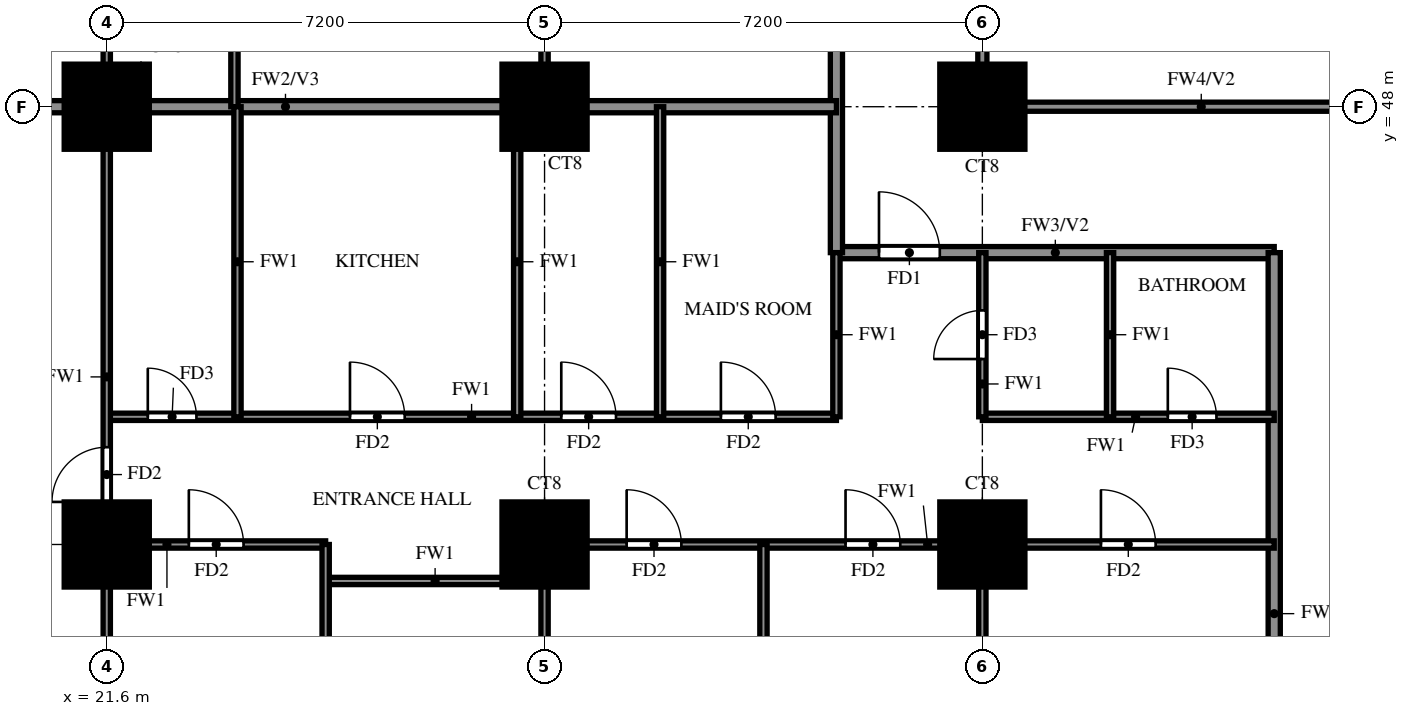
"""IFC4 building model, lengths in metres.
Left out: names, types, materials, properties, quantities, classifications, styles, units other than length and angle.
Written with IfcOpenShell. Run it as: python <this file> out.ifc"""

import sys

from ifc_helpers import new_model, si_unit, direction, frame, frame_2d, origin, origin_2d, place, context, subcontext, project, spatial, rectangle, extrude, source, transform, mapped, element, fill, save


model = new_model("IFC4")
c1 = context("Model", 3, precision=1e-05, world=origin(), true_north=direction((0.0, 1.0)))
c2 = subcontext(c1, "Body", "Model", "MODEL_VIEW")
j1 = project(units=[si_unit("LENGTHUNIT", "METRE"), si_unit("PLANEANGLEUNIT", "RADIAN")], contexts=[c1])
p1 = place(None, origin())
s1 = spatial("IfcSite", under=j1, at=p1, CompositionType="ELEMENT")
p2 = place(p1, origin())
s2 = spatial("IfcBuilding", under=s1, at=p2, CompositionType="ELEMENT")
p3 = place(p2, frame((0.0, 0.0, 51.5)))
s3 = spatial("IfcBuildingStorey", under=s2, at=p3, CompositionType="ELEMENT", Elevation=51.5)
m1 = source(origin(), c2, "Body", "SweptSolid", [
    extrude(rectangle(XDim=1.4, YDim=1.4, at=origin_2d()), origin(), (0.0, 0.0, 1.0), 3.18),
])
for number, where, z_axis, x_axis in (
    (1, (21.6, 40.8, 0.0), (0.0, 0.0, 1.0), (1.0, 0.0, 0.0)),
    (2, (28.8, 40.8, 0.0), (0.0, 0.0, 1.0), (1.0, 0.0, 0.0)),
    (3, (36.0, 40.8, 0.0), (0.0, 0.0, 1.0), (1.0, 0.0, 0.0)),
    (4, (21.6, 48.0, 0.0), (0.0, 0.0, 1.0), (1.0, 0.0, 0.0)),
    (5, (28.8, 48.0, 0.0), (0.0, 0.0, 1.0), (1.0, 0.0, 0.0)),
    (6, (36.0, 48.0, 0.0), (0.0, 0.0, 1.0), (1.0, 0.0, 0.0)),
):
    element("IfcColumn", number, at=place(p3, frame(where, z_axis=z_axis, x_axis=x_axis)), inside=s3, PredefinedType="COLUMN", context=c2, shape_type="MappedRepresentation", body=[
        mapped(m1, transform((0.0, 0.0, 0.0))),
    ])
p4 = place(p3, frame((33.6, 45.6, 0.0), z_axis=(0.0, 0.0, 1.0), x_axis=(1.0, 0.0, 0.0)))
e7 = element("IfcWall", 7, at=p4, inside=s3, PredefinedType="SOLIDWALL", context=c2, shape_type="SweptSolid", body=[
    extrude(rectangle(XDim=7.2, YDim=0.2, at=frame_2d((3.6, 0.0))), origin(), (0.0, 0.0, 1.0), 3.18),
])
p5 = place(p4, frame((0.7, 0.0, 0.0)))
e8 = element("IfcOpeningElement", 8, at=p5, cuts=e7, PredefinedType="OPENING", context=c2, shape_type="SweptSolid", body=[
    extrude(rectangle(XDim=1.0, YDim=2.1, at=frame_2d((0.5, 1.05))), frame((0.0, 0.11, 0.0), z_axis=(0.0, -1.0, 0.0), x_axis=(1.0, 0.0, 0.0)), (0.0, 0.0, 1.0), 0.22),
])
p6 = place(p3, frame((33.6, 45.6, 0.0), z_axis=(0.0, 0.0, 1.0), x_axis=(0.0, 1.0, 0.0)))
e9 = element("IfcWall", 9, at=p6, inside=s3, PredefinedType="SOLIDWALL", context=c2, shape_type="SweptSolid", body=[
    extrude(rectangle(XDim=8.4, YDim=0.2, at=frame_2d((4.2, 0.0))), origin(), (0.0, 0.0, 1.0), 3.18),
])
p7 = place(p3, frame((40.8, 33.725, 0.0), z_axis=(0.0, 0.0, 1.0), x_axis=(0.0, 1.0, 0.0)))
e10 = element("IfcWall", 10, at=p7, inside=s3, PredefinedType="SOLIDWALL", context=c2, shape_type="SweptSolid", body=[
    extrude(rectangle(XDim=11.875, YDim=0.2, at=frame_2d((5.938, 0.0))), origin(), (0.0, 0.0, 1.0), 2.28),
])
p8 = place(p3, frame((14.525, 48.0, 0.0), z_axis=(0.0, 0.0, 1.0), x_axis=(1.0, 0.0, 0.0)))
e11 = element("IfcWall", 11, at=p8, inside=s3, PredefinedType="SOLIDWALL", context=c2, shape_type="SweptSolid", body=[
    extrude(rectangle(XDim=19.075, YDim=0.2, at=frame_2d((9.538, 0.0))), origin(), (0.0, 0.0, 1.0), 3.18),
])
p9 = place(p3, frame((25.2, 40.2, 0.0), z_axis=(0.0, 0.0, 1.0), x_axis=(1.0, 0.0, 0.0)))
e12 = element("IfcWall", 12, at=p9, inside=s3, PredefinedType="PARTITIONING", context=c2, shape_type="SweptSolid", body=[
    extrude(rectangle(XDim=3.6, YDim=0.12, at=frame_2d((1.8, 0.0))), origin(), (0.0, 0.0, 1.0), 3.18),
])
p10 = place(p3, frame((21.6, 40.8, 0.0), z_axis=(0.0, 0.0, 1.0), x_axis=(1.0, 0.0, 0.0)))
e13 = element("IfcWall", 13, at=p10, inside=s3, PredefinedType="PARTITIONING", context=c2, shape_type="SweptSolid", body=[
    extrude(rectangle(XDim=3.6, YDim=0.12, at=frame_2d((1.8, 0.0))), origin(), (0.0, 0.0, 1.0), 3.18),
])
p11 = place(p10, frame((1.35, 0.0, 0.0)))
e14 = element("IfcOpeningElement", 14, at=p11, cuts=e13, PredefinedType="OPENING", context=c2, shape_type="SweptSolid", body=[
    extrude(rectangle(XDim=0.9, YDim=2.1, at=frame_2d((0.45, 1.05))), frame((0.0, 0.07, 0.0), z_axis=(0.0, -1.0, 0.0), x_axis=(1.0, 0.0, 0.0)), (0.0, 0.0, 1.0), 0.14),
])
p12 = place(p3, frame((28.8, 40.8, 0.0), z_axis=(0.0, 0.0, 1.0), x_axis=(1.0, 0.0, 0.0)))
e15 = element("IfcWall", 15, at=p12, inside=s3, PredefinedType="PARTITIONING", context=c2, shape_type="SweptSolid", body=[
    extrude(rectangle(XDim=12.0, YDim=0.12, at=frame_2d((6.0, 0.0))), origin(), (0.0, 0.0, 1.0), 3.18),
])
p13 = place(p12, frame((1.35, 0.0, 0.0)))
e16 = element("IfcOpeningElement", 16, at=p13, cuts=e15, PredefinedType="OPENING", context=c2, shape_type="SweptSolid", body=[
    extrude(rectangle(XDim=0.9, YDim=2.1, at=frame_2d((0.45, 1.05))), frame((0.0, 0.07, 0.0), z_axis=(0.0, -1.0, 0.0), x_axis=(1.0, 0.0, 0.0)), (0.0, 0.0, 1.0), 0.14),
])
p14 = place(p12, frame((4.95, 0.0, 0.0)))
e17 = element("IfcOpeningElement", 17, at=p14, cuts=e15, PredefinedType="OPENING", context=c2, shape_type="SweptSolid", body=[
    extrude(rectangle(XDim=0.9, YDim=2.1, at=frame_2d((0.45, 1.05))), frame((0.0, 0.07, 0.0), z_axis=(0.0, -1.0, 0.0), x_axis=(1.0, 0.0, 0.0)), (0.0, 0.0, 1.0), 0.14),
])
p15 = place(p12, frame((9.15, 0.0, 0.0)))
e18 = element("IfcOpeningElement", 18, at=p15, cuts=e15, PredefinedType="OPENING", context=c2, shape_type="SweptSolid", body=[
    extrude(rectangle(XDim=0.9, YDim=2.1, at=frame_2d((0.45, 1.05))), frame((0.0, 0.07, 0.0), z_axis=(0.0, -1.0, 0.0), x_axis=(1.0, 0.0, 0.0)), (0.0, 0.0, 1.0), 0.14),
])
p16 = place(p3, frame((21.6, 42.9, 0.0), z_axis=(0.0, 0.0, 1.0), x_axis=(1.0, 0.0, 0.0)))
e19 = element("IfcWall", 19, at=p16, inside=s3, PredefinedType="PARTITIONING", context=c2, shape_type="SweptSolid", body=[
    extrude(rectangle(XDim=12.0, YDim=0.12, at=frame_2d((6.0, 0.0))), origin(), (0.0, 0.0, 1.0), 3.18),
])
p17 = place(p16, frame((0.675, 0.0, 0.0)))
e20 = element("IfcOpeningElement", 20, at=p17, cuts=e19, PredefinedType="OPENING", context=c2, shape_type="SweptSolid", body=[
    extrude(rectangle(XDim=0.8, YDim=2.1, at=frame_2d((0.4, 1.05))), frame((0.0, 0.07, 0.0), z_axis=(0.0, -1.0, 0.0), x_axis=(1.0, 0.0, 0.0)), (0.0, 0.0, 1.0), 0.14),
])
p18 = place(p16, frame((4.0, 0.0, 0.0)))
e21 = element("IfcOpeningElement", 21, at=p18, cuts=e19, PredefinedType="OPENING", context=c2, shape_type="SweptSolid", body=[
    extrude(rectangle(XDim=0.9, YDim=2.1, at=frame_2d((0.45, 1.05))), frame((0.0, 0.07, 0.0), z_axis=(0.0, -1.0, 0.0), x_axis=(1.0, 0.0, 0.0)), (0.0, 0.0, 1.0), 0.14),
])
p19 = place(p16, frame((7.475, 0.0, 0.0)))
e22 = element("IfcOpeningElement", 22, at=p19, cuts=e19, PredefinedType="OPENING", context=c2, shape_type="SweptSolid", body=[
    extrude(rectangle(XDim=0.9, YDim=2.1, at=frame_2d((0.45, 1.05))), frame((0.0, 0.07, 0.0), z_axis=(0.0, -1.0, 0.0), x_axis=(1.0, 0.0, 0.0)), (0.0, 0.0, 1.0), 0.14),
])
p20 = place(p16, frame((10.1, 0.0, 0.0)))
e23 = element("IfcOpeningElement", 23, at=p20, cuts=e19, PredefinedType="OPENING", context=c2, shape_type="SweptSolid", body=[
    extrude(rectangle(XDim=0.9, YDim=2.1, at=frame_2d((0.45, 1.05))), frame((0.0, 0.07, 0.0), z_axis=(0.0, -1.0, 0.0), x_axis=(1.0, 0.0, 0.0)), (0.0, 0.0, 1.0), 0.14),
])
p21 = place(p3, frame((36.0, 42.9, 0.0), z_axis=(0.0, 0.0, 1.0), x_axis=(1.0, 0.0, 0.0)))
e24 = element("IfcWall", 24, at=p21, inside=s3, PredefinedType="PARTITIONING", context=c2, shape_type="SweptSolid", body=[
    extrude(rectangle(XDim=4.8, YDim=0.12, at=frame_2d((2.4, 0.0))), origin(), (0.0, 0.0, 1.0), 3.18),
])
p22 = place(p21, frame((3.05, 0.0, 0.0)))
e25 = element("IfcOpeningElement", 25, at=p22, cuts=e24, PredefinedType="OPENING", context=c2, shape_type="SweptSolid", body=[
    extrude(rectangle(XDim=0.8, YDim=2.1, at=frame_2d((0.4, 1.05))), frame((0.0, 0.07, 0.0), z_axis=(0.0, -1.0, 0.0), x_axis=(1.0, 0.0, 0.0)), (0.0, 0.0, 1.0), 0.14),
])
p23 = place(p3, frame((21.6, 33.725, 0.0), z_axis=(0.0, 0.0, 1.0), x_axis=(0.0, 1.0, 0.0)))
e26 = element("IfcWall", 26, at=p23, inside=s3, PredefinedType="PARTITIONING", context=c2, shape_type="SweptSolid", body=[
    extrude(rectangle(XDim=17.875, YDim=0.12, at=frame_2d((8.938, 0.0))), origin(), (0.0, 0.0, 1.0), 3.18),
])
p24 = place(p23, frame((7.775, 0.0, 0.0)))
e27 = element("IfcOpeningElement", 27, at=p24, cuts=e26, PredefinedType="OPENING", context=c2, shape_type="SweptSolid", body=[
    extrude(rectangle(XDim=0.9, YDim=2.1, at=frame_2d((0.45, 1.05))), frame((0.0, 0.07, 0.0), z_axis=(0.0, -1.0, 0.0), x_axis=(1.0, 0.0, 0.0)), (0.0, 0.0, 1.0), 0.14),
])
p25 = place(p23, frame((15.625, 0.0, 0.0)))
e28 = element("IfcOpeningElement", 28, at=p25, cuts=e26, PredefinedType="OPENING", context=c2, shape_type="SweptSolid", body=[
    extrude(rectangle(XDim=0.9, YDim=2.1, at=frame_2d((0.45, 1.05))), frame((0.0, 0.07, 0.0), z_axis=(0.0, -1.0, 0.0), x_axis=(1.0, 0.0, 0.0)), (0.0, 0.0, 1.0), 0.14),
])
p26 = place(p3, frame((23.7, 48.0, 0.0), z_axis=(0.0, 0.0, 1.0), x_axis=(0.0, 1.0, 0.0)))
e29 = element("IfcWall", 29, at=p26, inside=s3, PredefinedType="PARTITIONING", context=c2, shape_type="SweptSolid", body=[
    extrude(rectangle(XDim=3.6, YDim=0.12, at=frame_2d((1.8, 0.0))), origin(), (0.0, 0.0, 1.0), 3.18),
])
p27 = place(p3, frame((23.75, 42.9, 0.0), z_axis=(0.0, 0.0, 1.0), x_axis=(0.0, 1.0, 0.0)))
e30 = element("IfcWall", 30, at=p27, inside=s3, PredefinedType="PARTITIONING", context=c2, shape_type="SweptSolid", body=[
    extrude(rectangle(XDim=5.1, YDim=0.12, at=frame_2d((2.55, 0.0))), origin(), (0.0, 0.0, 1.0), 3.18),
])
p28 = place(p3, frame((25.2, 33.725, 0.0), z_axis=(0.0, 0.0, 1.0), x_axis=(0.0, 1.0, 0.0)))
e31 = element("IfcWall", 31, at=p28, inside=s3, PredefinedType="PARTITIONING", context=c2, shape_type="SweptSolid", body=[
    extrude(rectangle(XDim=7.075, YDim=0.12, at=frame_2d((3.538, 0.0))), origin(), (0.0, 0.0, 1.0), 2.28),
])
p29 = place(p28, frame((2.837, 0.0, 0.0)))
e32 = element("IfcOpeningElement", 32, at=p29, cuts=e31, PredefinedType="OPENING", context=c2, shape_type="SweptSolid", body=[
    extrude(rectangle(XDim=0.8, YDim=2.1, at=frame_2d((0.4, 1.05))), frame((0.0, 0.07, 0.0), z_axis=(0.0, -1.0, 0.0), x_axis=(1.0, 0.0, 0.0)), (0.0, 0.0, 1.0), 0.14),
])
p30 = place(p3, frame((28.35, 42.9, 0.0), z_axis=(0.0, 0.0, 1.0), x_axis=(0.0, 1.0, 0.0)))
e33 = element("IfcWall", 33, at=p30, inside=s3, PredefinedType="PARTITIONING", context=c2, shape_type="SweptSolid", body=[
    extrude(rectangle(XDim=5.1, YDim=0.12, at=frame_2d((2.55, 0.0))), origin(), (0.0, 0.0, 1.0), 3.18),
])
p31 = place(p3, frame((28.8, 33.725, 0.0), z_axis=(0.0, 0.0, 1.0), x_axis=(0.0, 1.0, 0.0)))
e34 = element("IfcWall", 34, at=p31, inside=s3, PredefinedType="PARTITIONING", context=c2, shape_type="SweptSolid", body=[
    extrude(rectangle(XDim=7.075, YDim=0.12, at=frame_2d((3.538, 0.0))), origin(), (0.0, 0.0, 1.0), 3.18),
])
p32 = place(p3, frame((28.8, 48.0, 0.0), z_axis=(0.0, 0.0, 1.0), x_axis=(0.0, 1.0, 0.0)))
e35 = element("IfcWall", 35, at=p32, inside=s3, PredefinedType="PARTITIONING", context=c2, shape_type="SweptSolid", body=[
    extrude(rectangle(XDim=3.6, YDim=0.12, at=frame_2d((1.8, 0.0))), origin(), (0.0, 0.0, 1.0), 3.18),
])
p33 = place(p3, frame((30.7, 42.9, 0.0), z_axis=(0.0, 0.0, 1.0), x_axis=(0.0, 1.0, 0.0)))
e36 = element("IfcWall", 36, at=p33, inside=s3, PredefinedType="PARTITIONING", context=c2, shape_type="SweptSolid", body=[
    extrude(rectangle(XDim=5.1, YDim=0.12, at=frame_2d((2.55, 0.0))), origin(), (0.0, 0.0, 1.0), 3.18),
])
p34 = place(p3, frame((32.4, 33.725, 0.0), z_axis=(0.0, 0.0, 1.0), x_axis=(0.0, 1.0, 0.0)))
e37 = element("IfcWall", 37, at=p34, inside=s3, PredefinedType="PARTITIONING", context=c2, shape_type="SweptSolid", body=[
    extrude(rectangle(XDim=7.075, YDim=0.12, at=frame_2d((3.538, 0.0))), origin(), (0.0, 0.0, 1.0), 2.28),
])
p35 = place(p3, frame((33.6, 42.9, 0.0), z_axis=(0.0, 0.0, 1.0), x_axis=(0.0, 1.0, 0.0)))
e38 = element("IfcWall", 38, at=p35, inside=s3, PredefinedType="PARTITIONING", context=c2, shape_type="SweptSolid", body=[
    extrude(rectangle(XDim=2.7, YDim=0.12, at=frame_2d((1.35, 0.0))), origin(), (0.0, 0.0, 1.0), 3.18),
])
p36 = place(p3, frame((36.0, 33.725, 0.0), z_axis=(0.0, 0.0, 1.0), x_axis=(0.0, 1.0, 0.0)))
e39 = element("IfcWall", 39, at=p36, inside=s3, PredefinedType="PARTITIONING", context=c2, shape_type="SweptSolid", body=[
    extrude(rectangle(XDim=7.075, YDim=0.12, at=frame_2d((3.538, 0.0))), origin(), (0.0, 0.0, 1.0), 3.18),
])
p37 = place(p3, frame((36.0, 42.9, 0.0), z_axis=(0.0, 0.0, 1.0), x_axis=(0.0, 1.0, 0.0)))
e40 = element("IfcWall", 40, at=p37, inside=s3, PredefinedType="PARTITIONING", context=c2, shape_type="SweptSolid", body=[
    extrude(rectangle(XDim=2.7, YDim=0.12, at=frame_2d((1.35, 0.0))), origin(), (0.0, 0.0, 1.0), 3.18),
])
p38 = place(p37, frame((0.95, 0.0, 0.0)))
e41 = element("IfcOpeningElement", 41, at=p38, cuts=e40, PredefinedType="OPENING", context=c2, shape_type="SweptSolid", body=[
    extrude(rectangle(XDim=0.8, YDim=2.1, at=frame_2d((0.4, 1.05))), frame((0.0, 0.07, 0.0), z_axis=(0.0, -1.0, 0.0), x_axis=(1.0, 0.0, 0.0)), (0.0, 0.0, 1.0), 0.14),
])
p39 = place(p3, frame((38.1, 42.9, 0.0), z_axis=(0.0, 0.0, 1.0), x_axis=(0.0, 1.0, 0.0)))
e42 = element("IfcWall", 42, at=p39, inside=s3, PredefinedType="PARTITIONING", context=c2, shape_type="SweptSolid", body=[
    extrude(rectangle(XDim=2.7, YDim=0.12, at=frame_2d((1.35, 0.0))), origin(), (0.0, 0.0, 1.0), 3.18),
])
p40 = place(p3, frame((36.0, 48.0, 0.0), z_axis=(0.0, 0.0, 1.0), x_axis=(1.0, 0.0, 0.0)))
e43 = element("IfcWall", 43, at=p40, inside=s3, PredefinedType="SOLIDWALL", context=c2, shape_type="SweptSolid", body=[
    extrude(rectangle(XDim=7.2, YDim=0.15, at=frame_2d((3.6, 0.0))), origin(), (0.0, 0.0, 1.0), 2.28),
])
p41 = place(p3, frame((36.0, 48.0, 0.0), z_axis=(0.0, 0.0, 1.0), x_axis=(0.0, 1.0, 0.0)))
e44 = element("IfcWall", 44, at=p41, inside=s3, PredefinedType="SOLIDWALL", context=c2, shape_type="SweptSolid", body=[
    extrude(rectangle(XDim=14.4, YDim=0.15, at=frame_2d((7.2, 0.0))), origin(), (0.0, 0.0, 1.0), 2.28),
])
p42 = place(p5, origin())
e45 = element("IfcDoor", 45, at=p42, inside=s3, OperationType="SINGLE_SWING_RIGHT", PredefinedType="DOOR", context=c2, shape_type="SweptSolid", body=[
    extrude(rectangle(XDim=1.0, YDim=2.1, at=frame_2d((0.5, 1.05))), frame((0.0, 0.025, 0.0), z_axis=(0.0, -1.0, 0.0), x_axis=(1.0, 0.0, 0.0)), (0.0, 0.0, 1.0), 0.05),
])
fill(e8, e45)
p43 = place(p24, origin())
e46 = element("IfcDoor", 46, at=p43, inside=s3, OperationType="SINGLE_SWING_RIGHT", PredefinedType="DOOR", context=c2, shape_type="SweptSolid", body=[
    extrude(rectangle(XDim=0.9, YDim=2.1, at=frame_2d((0.45, 1.05))), frame((0.0, 0.025, 0.0), z_axis=(0.0, -1.0, 0.0), x_axis=(1.0, 0.0, 0.0)), (0.0, 0.0, 1.0), 0.05),
])
fill(e27, e46)
p44 = place(p11, origin())
e47 = element("IfcDoor", 47, at=p44, inside=s3, OperationType="SINGLE_SWING_LEFT", PredefinedType="DOOR", context=c2, shape_type="SweptSolid", body=[
    extrude(rectangle(XDim=0.9, YDim=2.1, at=frame_2d((0.45, 1.05))), frame((0.0, 0.025, 0.0), z_axis=(0.0, -1.0, 0.0), x_axis=(1.0, 0.0, 0.0)), (0.0, 0.0, 1.0), 0.05),
])
fill(e14, e47)
p45 = place(p13, origin())
e48 = element("IfcDoor", 48, at=p45, inside=s3, OperationType="SINGLE_SWING_LEFT", PredefinedType="DOOR", context=c2, shape_type="SweptSolid", body=[
    extrude(rectangle(XDim=0.9, YDim=2.1, at=frame_2d((0.45, 1.05))), frame((0.0, 0.025, 0.0), z_axis=(0.0, -1.0, 0.0), x_axis=(1.0, 0.0, 0.0)), (0.0, 0.0, 1.0), 0.05),
])
fill(e16, e48)
p46 = place(p14, origin())
e49 = element("IfcDoor", 49, at=p46, inside=s3, OperationType="SINGLE_SWING_LEFT", PredefinedType="DOOR", context=c2, shape_type="SweptSolid", body=[
    extrude(rectangle(XDim=0.9, YDim=2.1, at=frame_2d((0.45, 1.05))), frame((0.0, 0.025, 0.0), z_axis=(0.0, -1.0, 0.0), x_axis=(1.0, 0.0, 0.0)), (0.0, 0.0, 1.0), 0.05),
])
fill(e17, e49)
p47 = place(p15, origin())
e50 = element("IfcDoor", 50, at=p47, inside=s3, OperationType="SINGLE_SWING_RIGHT", PredefinedType="DOOR", context=c2, shape_type="SweptSolid", body=[
    extrude(rectangle(XDim=0.9, YDim=2.1, at=frame_2d((0.45, 1.05))), frame((0.0, 0.025, 0.0), z_axis=(0.0, -1.0, 0.0), x_axis=(1.0, 0.0, 0.0)), (0.0, 0.0, 1.0), 0.05),
])
fill(e18, e50)
p48 = place(p17, origin())
e51 = element("IfcDoor", 51, at=p48, inside=s3, OperationType="SINGLE_SWING_LEFT", PredefinedType="DOOR", context=c2, shape_type="SweptSolid", body=[
    extrude(rectangle(XDim=0.8, YDim=2.1, at=frame_2d((0.4, 1.05))), frame((0.0, 0.025, 0.0), z_axis=(0.0, -1.0, 0.0), x_axis=(1.0, 0.0, 0.0)), (0.0, 0.0, 1.0), 0.05),
])
fill(e20, e51)
p49 = place(p18, origin())
e52 = element("IfcDoor", 52, at=p49, inside=s3, OperationType="SINGLE_SWING_LEFT", PredefinedType="DOOR", context=c2, shape_type="SweptSolid", body=[
    extrude(rectangle(XDim=0.9, YDim=2.1, at=frame_2d((0.45, 1.05))), frame((0.0, 0.025, 0.0), z_axis=(0.0, -1.0, 0.0), x_axis=(1.0, 0.0, 0.0)), (0.0, 0.0, 1.0), 0.05),
])
fill(e21, e52)
p50 = place(p19, origin())
e53 = element("IfcDoor", 53, at=p50, inside=s3, OperationType="SINGLE_SWING_RIGHT", PredefinedType="DOOR", context=c2, shape_type="SweptSolid", body=[
    extrude(rectangle(XDim=0.9, YDim=2.1, at=frame_2d((0.45, 1.05))), frame((0.0, 0.025, 0.0), z_axis=(0.0, -1.0, 0.0), x_axis=(1.0, 0.0, 0.0)), (0.0, 0.0, 1.0), 0.05),
])
fill(e22, e53)
p51 = place(p20, origin())
e54 = element("IfcDoor", 54, at=p51, inside=s3, OperationType="SINGLE_SWING_LEFT", PredefinedType="DOOR", context=c2, shape_type="SweptSolid", body=[
    extrude(rectangle(XDim=0.9, YDim=2.1, at=frame_2d((0.45, 1.05))), frame((0.0, 0.025, 0.0), z_axis=(0.0, -1.0, 0.0), x_axis=(1.0, 0.0, 0.0)), (0.0, 0.0, 1.0), 0.05),
])
fill(e23, e54)
p52 = place(p38, origin())
e55 = element("IfcDoor", 55, at=p52, inside=s3, OperationType="SINGLE_SWING_LEFT", PredefinedType="DOOR", context=c2, shape_type="SweptSolid", body=[
    extrude(rectangle(XDim=0.8, YDim=2.1, at=frame_2d((0.4, 1.05))), frame((0.0, 0.025, 0.0), z_axis=(0.0, -1.0, 0.0), x_axis=(1.0, 0.0, 0.0)), (0.0, 0.0, 1.0), 0.05),
])
fill(e41, e55)
p53 = place(p22, origin())
e56 = element("IfcDoor", 56, at=p53, inside=s3, OperationType="SINGLE_SWING_RIGHT", PredefinedType="DOOR", context=c2, shape_type="SweptSolid", body=[
    extrude(rectangle(XDim=0.8, YDim=2.1, at=frame_2d((0.4, 1.05))), frame((0.0, 0.025, 0.0), z_axis=(0.0, -1.0, 0.0), x_axis=(1.0, 0.0, 0.0)), (0.0, 0.0, 1.0), 0.05),
])
fill(e25, e56)
save(model, sys.argv[1])
